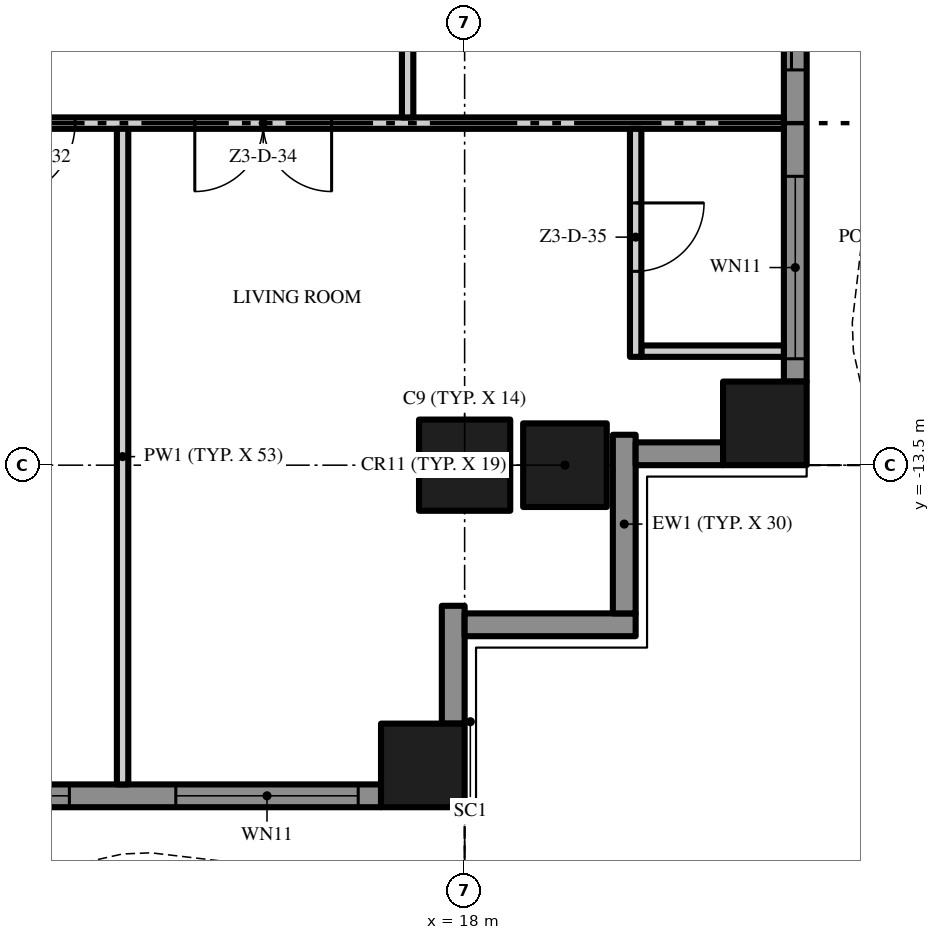
"""IFC4 building model, lengths in metres.
Left out: names, types, materials, properties, quantities, classifications, styles, units other than length and angle.
Written with IfcOpenShell. Run it as: python <this file> out.ifc"""

import sys

from ifc_helpers import new_model, si_unit, direction, frame, frame_2d, origin, origin_2d, place, context, subcontext, project, spatial, polyline, rectangle, outline, extrude, element, fill, save


model = new_model("IFC4")
c1 = context("Model", 3, precision=1e-05, world=origin(), true_north=direction((0.0, 1.0)))
c2 = subcontext(c1, "Body", "Model", "MODEL_VIEW")
j1 = project(units=[si_unit("LENGTHUNIT", "METRE"), si_unit("PLANEANGLEUNIT", "RADIAN")], contexts=[c1])
p1 = place(None, origin())
s1 = spatial("IfcSite", under=j1, at=p1, CompositionType="ELEMENT")
p2 = place(p1, origin())
s2 = spatial("IfcBuilding", under=s1, at=p2, CompositionType="ELEMENT")
p3 = place(p2, frame((0.0, 0.0, 163.0)))
s3 = spatial("IfcBuildingStorey", under=s2, at=p3, CompositionType="ELEMENT", Elevation=163.0)
p4 = place(p3, frame((18.0, -13.5, 0.0), z_axis=(0.0, 0.0, 1.0), x_axis=(1.0, 0.0, 0.0)))
e1 = element("IfcColumn", 1, at=p4, inside=s3, PredefinedType="COLUMN", context=c2, shape_type="SweptSolid", body=[
    extrude(rectangle(XDim=1.2, YDim=1.2, at=origin_2d()), origin(), (0.0, 0.0, 1.0), 3.5),
])
for number, where, z_axis, x_axis in (
    (2, (17.45, -17.45, 0.0), (0.0, 0.0, 1.0), (1.0, 0.0, 0.0)),
    (3, (21.95, -12.95, 0.0), (0.0, 0.0, 1.0), (1.0, 0.0, 0.0)),
    (4, (19.32, -13.5, 0.0), (0.0, 0.0, 1.0), (1.0, 0.0, 0.0)),
):
    element("IfcColumn", number, at=place(p3, frame(where, z_axis=z_axis, x_axis=x_axis)), inside=s3, PredefinedType="COLUMN", context=c2, shape_type="SweptSolid", body=[
        extrude(rectangle(XDim=1.1, YDim=1.1, at=origin_2d()), origin(), (0.0, 0.0, 1.0), 3.5),
    ])
p5 = place(p3, frame((16.9, -17.85, 0.0), z_axis=(0.0, 0.0, 1.0), x_axis=(-1.0, 0.0, 0.0)))
e5 = element("IfcWall", 5, at=p5, inside=s3, PredefinedType="SOLIDWALL", context=c2, shape_type="SweptSolid", body=[
    extrude(rectangle(XDim=7.35, YDim=0.3, at=frame_2d((3.675, 0.0))), origin(), (0.0, 0.0, 1.0), 3.5),
])
p6 = place(p5, frame((4.1, 0.0, 0.45)))
e6 = element("IfcOpeningElement", 6, at=p6, cuts=e5, PredefinedType="OPENING", context=c2, shape_type="SweptSolid", body=[
    extrude(rectangle(XDim=2.95, YDim=2.65, at=frame_2d((1.475, 1.325))), frame((0.0, 0.16, 0.0), z_axis=(0.0, -1.0, 0.0), x_axis=(1.0, 0.0, 0.0)), (0.0, 0.0, 1.0), 0.32),
])
p7 = place(p5, frame((0.3, 0.0, 0.45)))
e7 = element("IfcOpeningElement", 7, at=p7, cuts=e5, PredefinedType="OPENING", context=c2, shape_type="SweptSolid", body=[
    extrude(rectangle(XDim=2.4, YDim=2.65, at=frame_2d((1.2, 1.325))), frame((0.0, 0.16, 0.0), z_axis=(0.0, -1.0, 0.0), x_axis=(1.0, 0.0, 0.0)), (0.0, 0.0, 1.0), 0.32),
])
p8 = place(p3, frame((17.85, -15.35, 0.0), z_axis=(0.0, 0.0, 1.0), x_axis=(0.0, -1.0, 0.0)))
e8 = element("IfcWall", 8, at=p8, inside=s3, PredefinedType="SOLIDWALL", context=c2, shape_type="SweptSolid", body=[
    extrude(rectangle(XDim=1.55, YDim=0.3, at=frame_2d((0.775, 0.0))), origin(), (0.0, 0.0, 1.0), 3.5),
])
p9 = place(p3, frame((20.25, -15.6, 0.0), z_axis=(0.0, 0.0, 1.0), x_axis=(-1.0, 0.0, 0.0)))
e9 = element("IfcWall", 9, at=p9, inside=s3, PredefinedType="SOLIDWALL", context=c2, shape_type="SweptSolid", body=[
    extrude(rectangle(XDim=2.25, YDim=0.3, at=frame_2d((1.125, 0.0))), origin(), (0.0, 0.0, 1.0), 3.5),
])
p10 = place(p3, frame((20.1, -13.1, 0.0), z_axis=(0.0, 0.0, 1.0), x_axis=(0.0, -1.0, 0.0)))
e10 = element("IfcWall", 10, at=p10, inside=s3, PredefinedType="SOLIDWALL", context=c2, shape_type="SweptSolid", body=[
    extrude(rectangle(XDim=2.35, YDim=0.3, at=frame_2d((1.175, 0.0))), origin(), (0.0, 0.0, 1.0), 3.5),
])
p11 = place(p3, frame((21.4, -13.35, 0.0), z_axis=(0.0, 0.0, 1.0), x_axis=(-1.0, 0.0, 0.0)))
e11 = element("IfcWall", 11, at=p11, inside=s3, PredefinedType="SOLIDWALL", context=c2, shape_type="SweptSolid", body=[
    extrude(rectangle(XDim=1.15, YDim=0.3, at=frame_2d((0.575, 0.0))), origin(), (0.0, 0.0, 1.0), 3.5),
])
p12 = place(p3, frame((22.35, -5.05, 0.0), z_axis=(0.0, 0.0, 1.0), x_axis=(0.0, -1.0, 0.0)))
e12 = element("IfcWall", 12, at=p12, inside=s3, PredefinedType="SOLIDWALL", context=c2, shape_type="SweptSolid", body=[
    extrude(rectangle(XDim=7.35, YDim=0.3, at=frame_2d((3.675, 0.0))), origin(), (0.0, 0.0, 1.0), 3.5),
])
p13 = place(p12, frame((4.65, 0.0, 0.45)))
e13 = element("IfcOpeningElement", 13, at=p13, cuts=e12, PredefinedType="OPENING", context=c2, shape_type="SweptSolid", body=[
    extrude(rectangle(XDim=2.4, YDim=2.65, at=frame_2d((1.2, 1.325))), frame((0.0, 0.16, 0.0), z_axis=(0.0, -1.0, 0.0), x_axis=(1.0, 0.0, 0.0)), (0.0, 0.0, 1.0), 0.32),
])
p14 = place(p12, frame((0.3, 0.0, 0.0)))
e14 = element("IfcOpeningElement", 14, at=p14, cuts=e12, PredefinedType="OPENING", context=c2, shape_type="SweptSolid", body=[
    extrude(rectangle(XDim=2.95, YDim=2.4, at=frame_2d((1.475, 1.2))), frame((0.0, 0.16, 0.0), z_axis=(0.0, -1.0, 0.0), x_axis=(1.0, 0.0, 0.0)), (0.0, 0.0, 1.0), 0.32),
])
p15 = place(p3, origin())
e15 = element("IfcWall", 15, at=p15, inside=s3, PredefinedType="USERDEFINED", context=c2, shape_type="SweptSolid", body=[
    extrude(outline(polyline([(-18.0, -18.951), (-16.5, -18.615), (-16.125, -18.6), (-15.0, -18.731), (-13.5, -19.255), (-12.0, -19.988), (-10.5, -20.649), (-9.0, -20.985), (-8.625, -21.0), (-7.5, -20.869), (-6.0, -20.345), (-4.5, -19.612), (-3.0, -18.951), (-1.5, -18.615), (-1.125, -18.6), (0.0, -18.731), (1.5, -19.255), (3.0, -19.988), (4.5, -20.649), (6.0, -20.985), (6.375, -21.0), (7.5, -20.869), (9.0, -20.345), (10.5, -19.612), (12.0, -18.951), (13.5, -18.615), (13.875, -18.6), (15.0, -18.731), (16.5, -19.255), (18.0, -19.988), (18.11, -19.763), (16.596, -19.024), (15.056, -18.486), (13.885, -18.349), (13.467, -18.366), (11.921, -18.713), (10.395, -19.385), (8.904, -20.114), (7.444, -20.624), (6.365, -20.749), (6.033, -20.736), (4.579, -20.41), (3.105, -19.761), (1.596, -19.024), (0.056, -18.486), (-1.115, -18.349), (-1.533, -18.366), (-3.079, -18.713), (-4.605, -19.385), (-6.096, -20.114), (-7.556, -20.624), (-8.635, -20.749), (-8.967, -20.736), (-10.421, -20.41), (-11.895, -19.761), (-13.404, -19.024), (-14.944, -18.486), (-16.115, -18.349), (-16.533, -18.366), (-18.055, -18.708), (-18.0, -18.951)])), origin(), (0.0, 0.0, 1.0), 0.9),
])
p16 = place(p3, origin())
e16 = element("IfcWall", 16, at=p16, inside=s3, PredefinedType="USERDEFINED", context=c2, shape_type="SweptSolid", body=[
    extrude(outline(polyline([(23.451, -13.5), (23.115, -12.0), (23.1, -11.625), (23.231, -10.5), (23.755, -9.0), (24.488, -7.5), (25.149, -6.0), (25.485, -4.5), (25.5, -4.125), (25.369, -3.0), (24.845, -1.5), (24.112, 0.0), (23.451, 1.5), (23.115, 3.0), (23.1, 3.375), (23.231, 4.5), (23.755, 6.0), (24.488, 7.5), (25.149, 9.0), (25.485, 10.5), (25.5, 10.875), (25.369, 12.0), (24.845, 13.5), (24.112, 15.0), (23.451, 16.5), (23.115, 18.0), (22.871, 17.945), (23.213, 16.421), (23.885, 14.895), (24.614, 13.404), (25.124, 11.944), (25.249, 10.865), (25.236, 10.533), (24.91, 9.079), (24.261, 7.605), (23.524, 6.096), (22.986, 4.556), (22.849, 3.385), (22.866, 2.967), (23.213, 1.421), (23.885, -0.105), (24.614, -1.596), (25.124, -3.056), (25.249, -4.135), (25.236, -4.467), (24.91, -5.921), (24.261, -7.395), (23.524, -8.904), (22.986, -10.444), (22.849, -11.615), (22.866, -12.033), (23.208, -13.555), (23.451, -13.5)])), origin(), (0.0, 0.0, 1.0), 0.9),
])
p17 = place(p3, frame((20.325, -12.0, 0.0), z_axis=(0.0, 0.0, 1.0), x_axis=(1.0, 0.0, 0.0)))
e17 = element("IfcWall", 17, at=p17, inside=s3, PredefinedType="PARTITIONING", context=c2, shape_type="SweptSolid", body=[
    extrude(rectangle(XDim=1.875, YDim=0.15, at=frame_2d((0.938, 0.0))), origin(), (0.0, 0.0, 1.0), 3.5),
])
p18 = place(p3, frame((22.2, -9.0, 0.0), z_axis=(0.0, 0.0, 1.0), x_axis=(-1.0, 0.0, 0.0)))
e18 = element("IfcWall", 18, at=p18, inside=s3, PredefinedType="PARTITIONING", context=c2, shape_type="SweptSolid", body=[
    extrude(rectangle(XDim=10.875, YDim=0.15, at=frame_2d((5.438, 0.0))), origin(), (0.0, 0.0, 1.0), 3.5),
])
p19 = place(p18, frame((9.325, 0.0, 0.0)))
e19 = element("IfcOpeningElement", 19, at=p19, cuts=e18, PredefinedType="OPENING", context=c2, shape_type="SweptSolid", body=[
    extrude(rectangle(XDim=1.0, YDim=2.4, at=frame_2d((0.5, 1.2))), frame((0.0, 0.085, 0.0), z_axis=(0.0, -1.0, 0.0), x_axis=(1.0, 0.0, 0.0)), (0.0, 0.0, 1.0), 0.17),
])
p20 = place(p18, frame((5.95, 0.0, 0.0)))
e20 = element("IfcOpeningElement", 20, at=p20, cuts=e18, PredefinedType="OPENING", context=c2, shape_type="SweptSolid", body=[
    extrude(rectangle(XDim=1.8, YDim=2.4, at=frame_2d((0.9, 1.2))), frame((0.0, 0.085, 0.0), z_axis=(0.0, -1.0, 0.0), x_axis=(1.0, 0.0, 0.0)), (0.0, 0.0, 1.0), 0.17),
])
p21 = place(p3, frame((13.5, -17.7, 0.0), z_axis=(0.0, 0.0, 1.0), x_axis=(0.0, 1.0, 0.0)))
e21 = element("IfcWall", 21, at=p21, inside=s3, PredefinedType="PARTITIONING", context=c2, shape_type="SweptSolid", body=[
    extrude(rectangle(XDim=8.625, YDim=0.15, at=frame_2d((4.312, 0.0))), origin(), (0.0, 0.0, 1.0), 3.5),
])
p22 = place(p3, frame((17.25, -8.925, 0.0), z_axis=(0.0, 0.0, 1.0), x_axis=(0.0, 1.0, 0.0)))
e22 = element("IfcWall", 22, at=p22, inside=s3, PredefinedType="PARTITIONING", context=c2, shape_type="SweptSolid", body=[
    extrude(rectangle(XDim=4.5, YDim=0.15, at=frame_2d((2.25, 0.0))), origin(), (0.0, 0.0, 1.0), 3.5),
])
p23 = place(p3, frame((20.25, -9.075, 0.0), z_axis=(0.0, 0.0, 1.0), x_axis=(0.0, -1.0, 0.0)))
e23 = element("IfcWall", 23, at=p23, inside=s3, PredefinedType="PARTITIONING", context=c2, shape_type="SweptSolid", body=[
    extrude(rectangle(XDim=3.0, YDim=0.15, at=frame_2d((1.5, 0.0))), origin(), (0.0, 0.0, 1.0), 3.5),
])
p24 = place(p23, frame((0.975, 0.0, 0.0)))
e24 = element("IfcOpeningElement", 24, at=p24, cuts=e23, PredefinedType="OPENING", context=c2, shape_type="SweptSolid", body=[
    extrude(rectangle(XDim=0.9, YDim=2.1, at=frame_2d((0.45, 1.05))), frame((0.0, 0.085, 0.0), z_axis=(0.0, -1.0, 0.0), x_axis=(1.0, 0.0, 0.0)), (0.0, 0.0, 1.0), 0.17),
])
p25 = place(p6, origin())
e25 = element("IfcWindow", 25, at=p25, inside=s3, PartitioningType="SINGLE_PANEL", PredefinedType="WINDOW", context=c2, shape_type="SweptSolid", body=[
    extrude(rectangle(XDim=2.95, YDim=2.65, at=frame_2d((1.475, 1.325))), frame((0.0, 0.03, 0.0), z_axis=(0.0, -1.0, 0.0), x_axis=(1.0, 0.0, 0.0)), (0.0, 0.0, 1.0), 0.06),
])
fill(e6, e25)
p26 = place(p7, origin())
e26 = element("IfcWindow", 26, at=p26, inside=s3, PartitioningType="SINGLE_PANEL", PredefinedType="WINDOW", context=c2, shape_type="SweptSolid", body=[
    extrude(rectangle(XDim=2.4, YDim=2.65, at=frame_2d((1.2, 1.325))), frame((0.0, 0.03, 0.0), z_axis=(0.0, -1.0, 0.0), x_axis=(1.0, 0.0, 0.0)), (0.0, 0.0, 1.0), 0.06),
])
fill(e7, e26)
p27 = place(p13, origin())
e27 = element("IfcWindow", 27, at=p27, inside=s3, PartitioningType="SINGLE_PANEL", PredefinedType="WINDOW", context=c2, shape_type="SweptSolid", body=[
    extrude(rectangle(XDim=2.4, YDim=2.65, at=frame_2d((1.2, 1.325))), frame((0.0, 0.03, 0.0), z_axis=(0.0, -1.0, 0.0), x_axis=(1.0, 0.0, 0.0)), (0.0, 0.0, 1.0), 0.06),
])
fill(e13, e27)
p28 = place(p14, origin())
e28 = element("IfcDoor", 28, at=p28, inside=s3, OperationType="SINGLE_SWING_LEFT", PredefinedType="DOOR", context=c2, shape_type="SweptSolid", body=[
    extrude(rectangle(XDim=2.95, YDim=2.4, at=frame_2d((1.475, 1.2))), frame((0.0, 0.025, 0.0), z_axis=(0.0, -1.0, 0.0), x_axis=(1.0, 0.0, 0.0)), (0.0, 0.0, 1.0), 0.05),
])
fill(e14, e28)
p29 = place(p19, origin())
e29 = element("IfcDoor", 29, at=p29, inside=s3, OperationType="SINGLE_SWING_RIGHT", PredefinedType="DOOR", context=c2, shape_type="SweptSolid", body=[
    extrude(rectangle(XDim=1.0, YDim=2.4, at=frame_2d((0.5, 1.2))), frame((0.0, 0.025, 0.0), z_axis=(0.0, -1.0, 0.0), x_axis=(1.0, 0.0, 0.0)), (0.0, 0.0, 1.0), 0.05),
])
fill(e19, e29)
p30 = place(p20, origin())
e30 = element("IfcDoor", 30, at=p30, inside=s3, OperationType="DOUBLE_DOOR_SINGLE_SWING", PredefinedType="DOOR", context=c2, shape_type="SweptSolid", body=[
    extrude(rectangle(XDim=1.8, YDim=2.4, at=frame_2d((0.9, 1.2))), frame((0.0, 0.025, 0.0), z_axis=(0.0, -1.0, 0.0), x_axis=(1.0, 0.0, 0.0)), (0.0, 0.0, 1.0), 0.05),
])
fill(e20, e30)
p31 = place(p24, origin())
e31 = element("IfcDoor", 31, at=p31, inside=s3, OperationType="SINGLE_SWING_LEFT", PredefinedType="DOOR", context=c2, shape_type="SweptSolid", body=[
    extrude(rectangle(XDim=0.9, YDim=2.1, at=frame_2d((0.45, 1.05))), frame((0.0, 0.025, 0.0), z_axis=(0.0, -1.0, 0.0), x_axis=(1.0, 0.0, 0.0)), (0.0, 0.0, 1.0), 0.05),
])
fill(e24, e31)
save(model, sys.argv[1])
